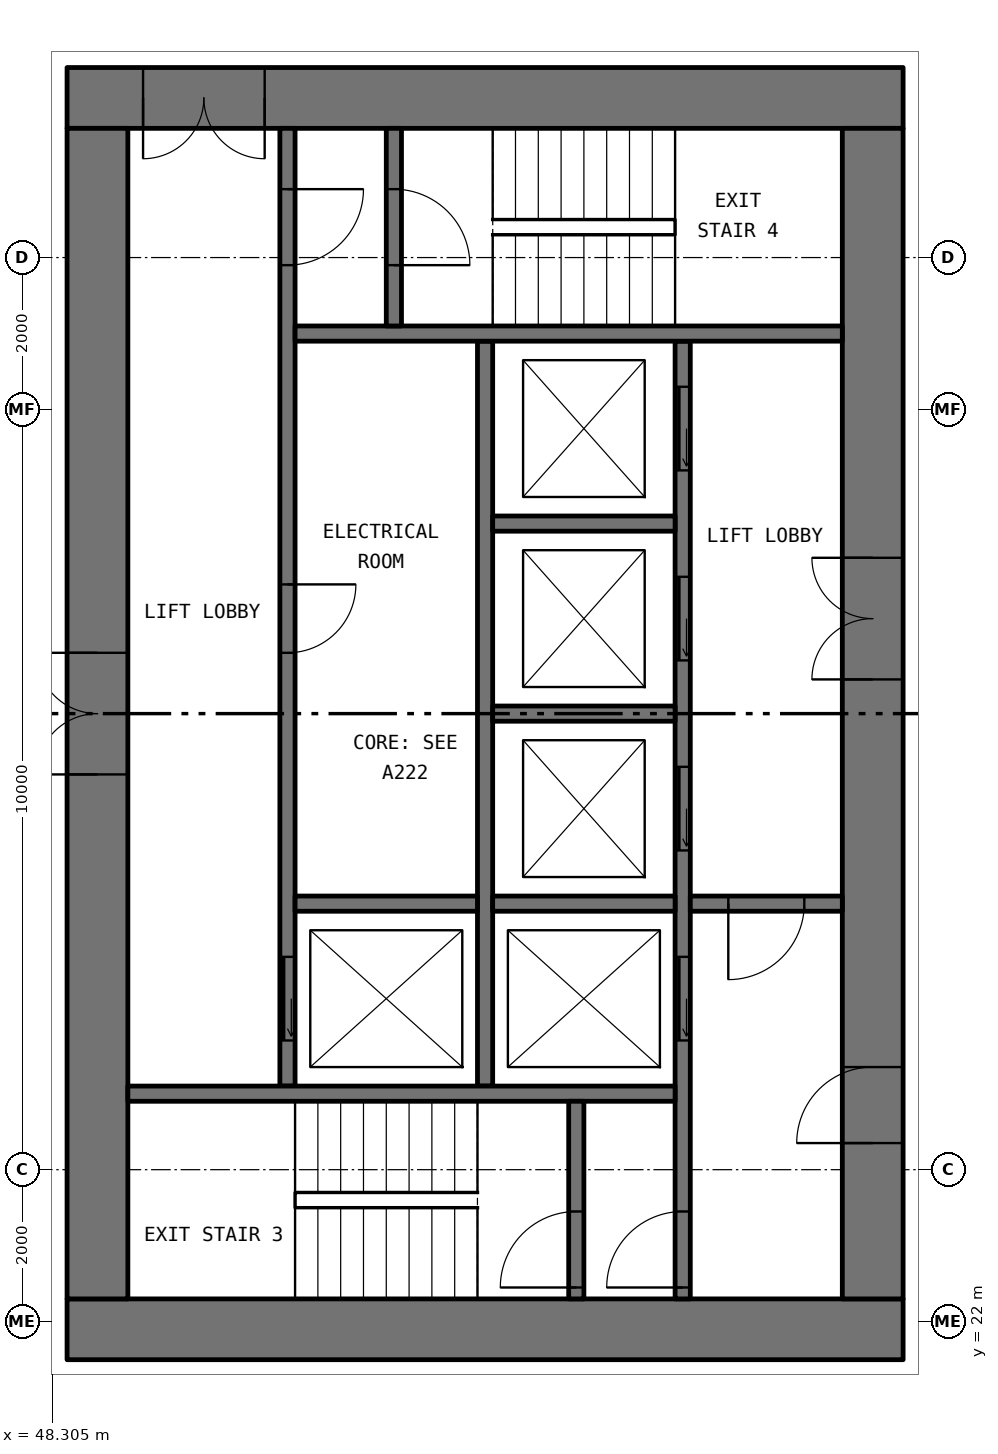
"""IFC4 building model, lengths in metres.
Left out: names, types, materials, properties, quantities, classifications, styles, units other than length and angle.
Written with IfcOpenShell. Run it as: python <this file> out.ifc"""

import sys

from ifc_helpers import new_model, si_unit, direction, frame, frame_2d, origin, place, context, subcontext, project, spatial, rectangle, extrude, element, fill, save


model = new_model("IFC4")
c1 = context("Model", 3, precision=1e-05, world=origin(), true_north=direction((0.0, 1.0)))
c2 = subcontext(c1, "Body", "Model", "MODEL_VIEW")
j1 = project(units=[si_unit("LENGTHUNIT", "METRE"), si_unit("PLANEANGLEUNIT", "RADIAN")], contexts=[c1])
p1 = place(None, origin())
s1 = spatial("IfcSite", under=j1, at=p1, CompositionType="ELEMENT")
p2 = place(p1, origin())
s2 = spatial("IfcBuilding", under=s1, at=p2, CompositionType="ELEMENT")
p3 = place(p2, frame((0.0, 0.0, 85.2)))
s3 = spatial("IfcBuildingStorey", under=s2, at=p3, CompositionType="ELEMENT", Elevation=85.2)
p4 = place(p3, frame((59.5, 21.9, 0.0), z_axis=(0.0, 0.0, 1.0), x_axis=(-1.0, 0.0, 0.0)))
e1 = element("IfcWall", 1, at=p4, inside=s3, PredefinedType="SHEAR", context=c2, shape_type="SweptSolid", body=[
    extrude(rectangle(XDim=11.0, YDim=0.8, at=frame_2d((5.5, 0.0))), origin(), (0.0, 0.0, 1.0), 3.05),
])
p5 = place(p3, frame((59.5, 38.1, 0.0), z_axis=(0.0, 0.0, 1.0), x_axis=(-1.0, 0.0, 0.0)))
e2 = element("IfcWall", 2, at=p5, inside=s3, PredefinedType="SHEAR", context=c2, shape_type="SweptSolid", body=[
    extrude(rectangle(XDim=11.0, YDim=0.8, at=frame_2d((5.5, 0.0))), origin(), (0.0, 0.0, 1.0), 3.05),
])
p6 = place(p5, frame((8.4, 0.0, 0.0)))
e3 = element("IfcOpeningElement", 3, at=p6, cuts=e2, PredefinedType="OPENING", context=c2, shape_type="SweptSolid", body=[
    extrude(rectangle(XDim=1.6, YDim=2.1, at=frame_2d((0.8, 1.05))), frame((0.0, 0.41, 0.0), z_axis=(0.0, -1.0, 0.0), x_axis=(1.0, 0.0, 0.0)), (0.0, 0.0, 1.0), 0.82),
])
p7 = place(p3, frame((59.1, 22.3, 0.0), z_axis=(0.0, 0.0, 1.0), x_axis=(0.0, 1.0, 0.0)))
e4 = element("IfcWall", 4, at=p7, inside=s3, PredefinedType="SHEAR", context=c2, shape_type="SweptSolid", body=[
    extrude(rectangle(XDim=15.4, YDim=0.8, at=frame_2d((7.7, 0.0))), origin(), (0.0, 0.0, 1.0), 3.05),
])
p8 = place(p7, frame((8.15, 0.0, 0.0)))
e5 = element("IfcOpeningElement", 5, at=p8, cuts=e4, PredefinedType="OPENING", context=c2, shape_type="SweptSolid", body=[
    extrude(rectangle(XDim=1.6, YDim=2.1, at=frame_2d((0.8, 1.05))), frame((0.0, 0.41, 0.0), z_axis=(0.0, -1.0, 0.0), x_axis=(1.0, 0.0, 0.0)), (0.0, 0.0, 1.0), 0.82),
])
p9 = place(p7, frame((2.05, 0.0, 0.0)))
e6 = element("IfcOpeningElement", 6, at=p9, cuts=e4, PredefinedType="OPENING", context=c2, shape_type="SweptSolid", body=[
    extrude(rectangle(XDim=1.0, YDim=2.1, at=frame_2d((0.5, 1.05))), frame((0.0, 0.41, 0.0), z_axis=(0.0, -1.0, 0.0), x_axis=(1.0, 0.0, 0.0)), (0.0, 0.0, 1.0), 0.82),
])
p10 = place(p3, frame((48.9, 22.3, 0.0), z_axis=(0.0, 0.0, 1.0), x_axis=(0.0, 1.0, 0.0)))
e7 = element("IfcWall", 7, at=p10, inside=s3, PredefinedType="SHEAR", context=c2, shape_type="SweptSolid", body=[
    extrude(rectangle(XDim=15.4, YDim=0.8, at=frame_2d((7.7, 0.0))), origin(), (0.0, 0.0, 1.0), 3.05),
])
p11 = place(p10, frame((6.9, 0.0, 0.0)))
e8 = element("IfcOpeningElement", 8, at=p11, cuts=e7, PredefinedType="OPENING", context=c2, shape_type="SweptSolid", body=[
    extrude(rectangle(XDim=1.6, YDim=2.1, at=frame_2d((0.8, 1.05))), frame((0.0, 0.41, 0.0), z_axis=(0.0, -1.0, 0.0), x_axis=(1.0, 0.0, 0.0)), (0.0, 0.0, 1.0), 0.82),
])
p12 = place(p3, frame((56.6, 22.3, 0.0), z_axis=(0.0, 0.0, 1.0), x_axis=(0.0, 1.0, 0.0)))
e9 = element("IfcWall", 9, at=p12, inside=s3, PredefinedType="SOLIDWALL", context=c2, shape_type="SweptSolid", body=[
    extrude(rectangle(XDim=12.6, YDim=0.2, at=frame_2d((6.3, 0.0))), origin(), (0.0, 0.0, 1.0), 3.05),
])
p13 = place(p12, frame((3.4, 0.0, 0.0)))
e10 = element("IfcOpeningElement", 10, at=p13, cuts=e9, PredefinedType="OPENING", context=c2, shape_type="SweptSolid", body=[
    extrude(rectangle(XDim=1.1, YDim=2.1, at=frame_2d((0.55, 1.05))), frame((0.0, 0.11, 0.0), z_axis=(0.0, -1.0, 0.0), x_axis=(1.0, 0.0, 0.0)), (0.0, 0.0, 1.0), 0.22),
])
p14 = place(p12, frame((5.9, 0.0, 0.0)))
e11 = element("IfcOpeningElement", 11, at=p14, cuts=e9, PredefinedType="OPENING", context=c2, shape_type="SweptSolid", body=[
    extrude(rectangle(XDim=1.1, YDim=2.1, at=frame_2d((0.55, 1.05))), frame((0.0, 0.11, 0.0), z_axis=(0.0, -1.0, 0.0), x_axis=(1.0, 0.0, 0.0)), (0.0, 0.0, 1.0), 0.22),
])
p15 = place(p12, frame((8.4, 0.0, 0.0)))
e12 = element("IfcOpeningElement", 12, at=p15, cuts=e9, PredefinedType="OPENING", context=c2, shape_type="SweptSolid", body=[
    extrude(rectangle(XDim=1.1, YDim=2.1, at=frame_2d((0.55, 1.05))), frame((0.0, 0.11, 0.0), z_axis=(0.0, -1.0, 0.0), x_axis=(1.0, 0.0, 0.0)), (0.0, 0.0, 1.0), 0.22),
])
p16 = place(p12, frame((10.9, 0.0, 0.0)))
e13 = element("IfcOpeningElement", 13, at=p16, cuts=e9, PredefinedType="OPENING", context=c2, shape_type="SweptSolid", body=[
    extrude(rectangle(XDim=1.1, YDim=2.1, at=frame_2d((0.55, 1.05))), frame((0.0, 0.11, 0.0), z_axis=(0.0, -1.0, 0.0), x_axis=(1.0, 0.0, 0.0)), (0.0, 0.0, 1.0), 0.22),
])
p17 = place(p12, frame((0.15, 0.0, 0.0)))
e14 = element("IfcOpeningElement", 14, at=p17, cuts=e9, PredefinedType="OPENING", context=c2, shape_type="SweptSolid", body=[
    extrude(rectangle(XDim=1.0, YDim=2.1, at=frame_2d((0.5, 1.05))), frame((0.0, 0.11, 0.0), z_axis=(0.0, -1.0, 0.0), x_axis=(1.0, 0.0, 0.0)), (0.0, 0.0, 1.0), 0.22),
])
p18 = place(p3, frame((51.4, 25.1, 0.0), z_axis=(0.0, 0.0, 1.0), x_axis=(0.0, 1.0, 0.0)))
e15 = element("IfcWall", 15, at=p18, inside=s3, PredefinedType="SOLIDWALL", context=c2, shape_type="SweptSolid", body=[
    extrude(rectangle(XDim=12.6, YDim=0.2, at=frame_2d((6.3, 0.0))), origin(), (0.0, 0.0, 1.0), 3.05),
])
p19 = place(p18, frame((0.6, 0.0, 0.0)))
e16 = element("IfcOpeningElement", 16, at=p19, cuts=e15, PredefinedType="OPENING", context=c2, shape_type="SweptSolid", body=[
    extrude(rectangle(XDim=1.1, YDim=2.1, at=frame_2d((0.55, 1.05))), frame((0.0, 0.11, 0.0), z_axis=(0.0, -1.0, 0.0), x_axis=(1.0, 0.0, 0.0)), (0.0, 0.0, 1.0), 0.22),
])
p20 = place(p18, frame((10.8, 0.0, 0.0)))
e17 = element("IfcOpeningElement", 17, at=p20, cuts=e15, PredefinedType="OPENING", context=c2, shape_type="SweptSolid", body=[
    extrude(rectangle(XDim=1.0, YDim=2.1, at=frame_2d((0.5, 1.05))), frame((0.0, 0.11, 0.0), z_axis=(0.0, -1.0, 0.0), x_axis=(1.0, 0.0, 0.0)), (0.0, 0.0, 1.0), 0.22),
])
p21 = place(p18, frame((5.7, 0.0, 0.0)))
e18 = element("IfcOpeningElement", 18, at=p21, cuts=e15, PredefinedType="OPENING", context=c2, shape_type="SweptSolid", body=[
    extrude(rectangle(XDim=0.9, YDim=2.1, at=frame_2d((0.45, 1.05))), frame((0.0, 0.11, 0.0), z_axis=(0.0, -1.0, 0.0), x_axis=(1.0, 0.0, 0.0)), (0.0, 0.0, 1.0), 0.22),
])
p22 = place(p3, frame((54.0, 25.1, 0.0), z_axis=(0.0, 0.0, 1.0), x_axis=(0.0, 1.0, 0.0)))
e19 = element("IfcWall", 19, at=p22, inside=s3, PredefinedType="SOLIDWALL", context=c2, shape_type="SweptSolid", body=[
    extrude(rectangle(XDim=9.8, YDim=0.2, at=frame_2d((4.9, 0.0))), origin(), (0.0, 0.0, 1.0), 3.05),
])
for number, where, z_axis, x_axis in (
    (20, (56.5, 25.0, 0.0), (0.0, 0.0, 1.0), (-1.0, 0.0, 0.0)),
    (21, (58.7, 35.0, 0.0), (0.0, 0.0, 1.0), (-1.0, 0.0, 0.0)),
):
    element("IfcWall", number, at=place(p3, frame(where, z_axis=z_axis, x_axis=x_axis)), inside=s3, PredefinedType="SOLIDWALL", context=c2, shape_type="SweptSolid", body=[
        extrude(rectangle(XDim=7.2, YDim=0.2, at=frame_2d((3.6, 0.0))), origin(), (0.0, 0.0, 1.0), 3.05),
    ])
p23 = place(p3, frame((58.7, 27.5, 0.0), z_axis=(0.0, 0.0, 1.0), x_axis=(-1.0, 0.0, 0.0)))
e22 = element("IfcWall", 22, at=p23, inside=s3, PredefinedType="SOLIDWALL", context=c2, shape_type="SweptSolid", body=[
    extrude(rectangle(XDim=2.0, YDim=0.2, at=frame_2d((1.0, 0.0))), origin(), (0.0, 0.0, 1.0), 3.05),
])
p24 = place(p23, frame((0.5, 0.0, 0.0)))
e23 = element("IfcOpeningElement", 23, at=p24, cuts=e22, PredefinedType="OPENING", context=c2, shape_type="SweptSolid", body=[
    extrude(rectangle(XDim=1.0, YDim=2.1, at=frame_2d((0.5, 1.05))), frame((0.0, 0.11, 0.0), z_axis=(0.0, -1.0, 0.0), x_axis=(1.0, 0.0, 0.0)), (0.0, 0.0, 1.0), 0.22),
])
p25 = place(p3, frame((55.2, 22.3, 0.0), z_axis=(0.0, 0.0, 1.0), x_axis=(0.0, 1.0, 0.0)))
e24 = element("IfcWall", 24, at=p25, inside=s3, PredefinedType="SOLIDWALL", context=c2, shape_type="SweptSolid", body=[
    extrude(rectangle(XDim=2.6, YDim=0.2, at=frame_2d((1.3, 0.0))), origin(), (0.0, 0.0, 1.0), 3.05),
])
p26 = place(p25, frame((0.15, 0.0, 0.0)))
e25 = element("IfcOpeningElement", 25, at=p26, cuts=e24, PredefinedType="OPENING", context=c2, shape_type="SweptSolid", body=[
    extrude(rectangle(XDim=1.0, YDim=2.1, at=frame_2d((0.5, 1.05))), frame((0.0, 0.11, 0.0), z_axis=(0.0, -1.0, 0.0), x_axis=(1.0, 0.0, 0.0)), (0.0, 0.0, 1.0), 0.22),
])
p27 = place(p3, frame((52.8, 35.1, 0.0), z_axis=(0.0, 0.0, 1.0), x_axis=(0.0, 1.0, 0.0)))
e26 = element("IfcWall", 26, at=p27, inside=s3, PredefinedType="SOLIDWALL", context=c2, shape_type="SweptSolid", body=[
    extrude(rectangle(XDim=2.6, YDim=0.2, at=frame_2d((1.3, 0.0))), origin(), (0.0, 0.0, 1.0), 3.05),
])
p28 = place(p27, frame((0.8, 0.0, 0.0)))
e27 = element("IfcOpeningElement", 27, at=p28, cuts=e26, PredefinedType="OPENING", context=c2, shape_type="SweptSolid", body=[
    extrude(rectangle(XDim=1.0, YDim=2.1, at=frame_2d((0.5, 1.05))), frame((0.0, 0.11, 0.0), z_axis=(0.0, -1.0, 0.0), x_axis=(1.0, 0.0, 0.0)), (0.0, 0.0, 1.0), 0.22),
])
for number, where, z_axis, x_axis in (
    (28, (56.5, 27.5, 0.0), (0.0, 0.0, 1.0), (-1.0, 0.0, 0.0)),
    (29, (56.5, 30.0, 0.0), (0.0, 0.0, 1.0), (-1.0, 0.0, 0.0)),
    (30, (56.5, 32.5, 0.0), (0.0, 0.0, 1.0), (-1.0, 0.0, 0.0)),
    (31, (53.9, 27.5, 0.0), (0.0, 0.0, 1.0), (-1.0, 0.0, 0.0)),
):
    element("IfcWall", number, at=place(p3, frame(where, z_axis=z_axis, x_axis=x_axis)), inside=s3, PredefinedType="SOLIDWALL", context=c2, shape_type="SweptSolid", body=[
        extrude(rectangle(XDim=2.4, YDim=0.2, at=frame_2d((1.2, 0.0))), origin(), (0.0, 0.0, 1.0), 3.05),
    ])
p29 = place(p19, origin())
e32 = element("IfcDoor", 32, at=p29, inside=s3, OperationType="SLIDING_TO_LEFT", PredefinedType="DOOR", context=c2, shape_type="SweptSolid", body=[
    extrude(rectangle(XDim=1.1, YDim=2.1, at=frame_2d((0.55, 1.05))), frame((0.0, 0.025, 0.0), z_axis=(0.0, -1.0, 0.0), x_axis=(1.0, 0.0, 0.0)), (0.0, 0.0, 1.0), 0.05),
])
fill(e16, e32)
p30 = place(p13, origin())
e33 = element("IfcDoor", 33, at=p30, inside=s3, OperationType="SLIDING_TO_LEFT", PredefinedType="DOOR", context=c2, shape_type="SweptSolid", body=[
    extrude(rectangle(XDim=1.1, YDim=2.1, at=frame_2d((0.55, 1.05))), frame((0.0, 0.025, 0.0), z_axis=(0.0, -1.0, 0.0), x_axis=(1.0, 0.0, 0.0)), (0.0, 0.0, 1.0), 0.05),
])
fill(e10, e33)
p31 = place(p14, origin())
e34 = element("IfcDoor", 34, at=p31, inside=s3, OperationType="SLIDING_TO_LEFT", PredefinedType="DOOR", context=c2, shape_type="SweptSolid", body=[
    extrude(rectangle(XDim=1.1, YDim=2.1, at=frame_2d((0.55, 1.05))), frame((0.0, 0.025, 0.0), z_axis=(0.0, -1.0, 0.0), x_axis=(1.0, 0.0, 0.0)), (0.0, 0.0, 1.0), 0.05),
])
fill(e11, e34)
p32 = place(p15, origin())
e35 = element("IfcDoor", 35, at=p32, inside=s3, OperationType="SLIDING_TO_LEFT", PredefinedType="DOOR", context=c2, shape_type="SweptSolid", body=[
    extrude(rectangle(XDim=1.1, YDim=2.1, at=frame_2d((0.55, 1.05))), frame((0.0, 0.025, 0.0), z_axis=(0.0, -1.0, 0.0), x_axis=(1.0, 0.0, 0.0)), (0.0, 0.0, 1.0), 0.05),
])
fill(e12, e35)
p33 = place(p16, origin())
e36 = element("IfcDoor", 36, at=p33, inside=s3, OperationType="SLIDING_TO_LEFT", PredefinedType="DOOR", context=c2, shape_type="SweptSolid", body=[
    extrude(rectangle(XDim=1.1, YDim=2.1, at=frame_2d((0.55, 1.05))), frame((0.0, 0.025, 0.0), z_axis=(0.0, -1.0, 0.0), x_axis=(1.0, 0.0, 0.0)), (0.0, 0.0, 1.0), 0.05),
])
fill(e13, e36)
p34 = place(p26, origin())
e37 = element("IfcDoor", 37, at=p34, inside=s3, OperationType="SINGLE_SWING_RIGHT", PredefinedType="DOOR", context=c2, shape_type="SweptSolid", body=[
    extrude(rectangle(XDim=1.0, YDim=2.1, at=frame_2d((0.5, 1.05))), frame((0.0, 0.025, 0.0), z_axis=(0.0, -1.0, 0.0), x_axis=(1.0, 0.0, 0.0)), (0.0, 0.0, 1.0), 0.05),
])
fill(e25, e37)
p35 = place(p17, origin())
e38 = element("IfcDoor", 38, at=p35, inside=s3, OperationType="SINGLE_SWING_RIGHT", PredefinedType="DOOR", context=c2, shape_type="SweptSolid", body=[
    extrude(rectangle(XDim=1.0, YDim=2.1, at=frame_2d((0.5, 1.05))), frame((0.0, 0.025, 0.0), z_axis=(0.0, -1.0, 0.0), x_axis=(1.0, 0.0, 0.0)), (0.0, 0.0, 1.0), 0.05),
])
fill(e14, e38)
p36 = place(p20, frame((1.0, 0.0, 0.0), x_axis=(-1.0, 0.0, 0.0)))
e39 = element("IfcDoor", 39, at=p36, inside=s3, OperationType="SINGLE_SWING_RIGHT", PredefinedType="DOOR", context=c2, shape_type="SweptSolid", body=[
    extrude(rectangle(XDim=1.0, YDim=2.1, at=frame_2d((0.5, 1.05))), frame((0.0, 0.025, 0.0), z_axis=(0.0, -1.0, 0.0), x_axis=(1.0, 0.0, 0.0)), (0.0, 0.0, 1.0), 0.05),
])
fill(e17, e39)
p37 = place(p28, frame((1.0, 0.0, 0.0), x_axis=(-1.0, 0.0, 0.0)))
e40 = element("IfcDoor", 40, at=p37, inside=s3, OperationType="SINGLE_SWING_LEFT", PredefinedType="DOOR", context=c2, shape_type="SweptSolid", body=[
    extrude(rectangle(XDim=1.0, YDim=2.1, at=frame_2d((0.5, 1.05))), frame((0.0, 0.025, 0.0), z_axis=(0.0, -1.0, 0.0), x_axis=(1.0, 0.0, 0.0)), (0.0, 0.0, 1.0), 0.05),
])
fill(e27, e40)
p38 = place(p24, origin())
e41 = element("IfcDoor", 41, at=p38, inside=s3, OperationType="SINGLE_SWING_LEFT", PredefinedType="DOOR", context=c2, shape_type="SweptSolid", body=[
    extrude(rectangle(XDim=1.0, YDim=2.1, at=frame_2d((0.5, 1.05))), frame((0.0, 0.025, 0.0), z_axis=(0.0, -1.0, 0.0), x_axis=(1.0, 0.0, 0.0)), (0.0, 0.0, 1.0), 0.05),
])
fill(e23, e41)
p39 = place(p8, origin())
e42 = element("IfcDoor", 42, at=p39, inside=s3, OperationType="DOUBLE_DOOR_SINGLE_SWING", PredefinedType="DOOR", context=c2, shape_type="SweptSolid", body=[
    extrude(rectangle(XDim=1.6, YDim=2.1, at=frame_2d((0.8, 1.05))), frame((0.0, 0.025, 0.0), z_axis=(0.0, -1.0, 0.0), x_axis=(1.0, 0.0, 0.0)), (0.0, 0.0, 1.0), 0.05),
])
fill(e5, e42)
p40 = place(p9, origin())
e43 = element("IfcDoor", 43, at=p40, inside=s3, OperationType="SINGLE_SWING_RIGHT", PredefinedType="DOOR", context=c2, shape_type="SweptSolid", body=[
    extrude(rectangle(XDim=1.0, YDim=2.1, at=frame_2d((0.5, 1.05))), frame((0.0, 0.025, 0.0), z_axis=(0.0, -1.0, 0.0), x_axis=(1.0, 0.0, 0.0)), (0.0, 0.0, 1.0), 0.05),
])
fill(e6, e43)
p41 = place(p6, origin())
e44 = element("IfcDoor", 44, at=p41, inside=s3, OperationType="DOUBLE_DOOR_SINGLE_SWING", PredefinedType="DOOR", context=c2, shape_type="SweptSolid", body=[
    extrude(rectangle(XDim=1.6, YDim=2.1, at=frame_2d((0.8, 1.05))), frame((0.0, 0.025, 0.0), z_axis=(0.0, -1.0, 0.0), x_axis=(1.0, 0.0, 0.0)), (0.0, 0.0, 1.0), 0.05),
])
fill(e3, e44)
p42 = place(p11, origin())
e45 = element("IfcDoor", 45, at=p42, inside=s3, OperationType="DOUBLE_DOOR_SINGLE_SWING", PredefinedType="DOOR", context=c2, shape_type="SweptSolid", body=[
    extrude(rectangle(XDim=1.6, YDim=2.1, at=frame_2d((0.8, 1.05))), frame((0.0, 0.025, 0.0), z_axis=(0.0, -1.0, 0.0), x_axis=(1.0, 0.0, 0.0)), (0.0, 0.0, 1.0), 0.05),
])
fill(e8, e45)
p43 = place(p21, frame((0.9, 0.0, 0.0), x_axis=(-1.0, 0.0, 0.0)))
e46 = element("IfcDoor", 46, at=p43, inside=s3, OperationType="SINGLE_SWING_RIGHT", PredefinedType="DOOR", context=c2, shape_type="SweptSolid", body=[
    extrude(rectangle(XDim=0.9, YDim=2.1, at=frame_2d((0.45, 1.05))), frame((0.0, 0.025, 0.0), z_axis=(0.0, -1.0, 0.0), x_axis=(1.0, 0.0, 0.0)), (0.0, 0.0, 1.0), 0.05),
])
fill(e18, e46)
save(model, sys.argv[1])
